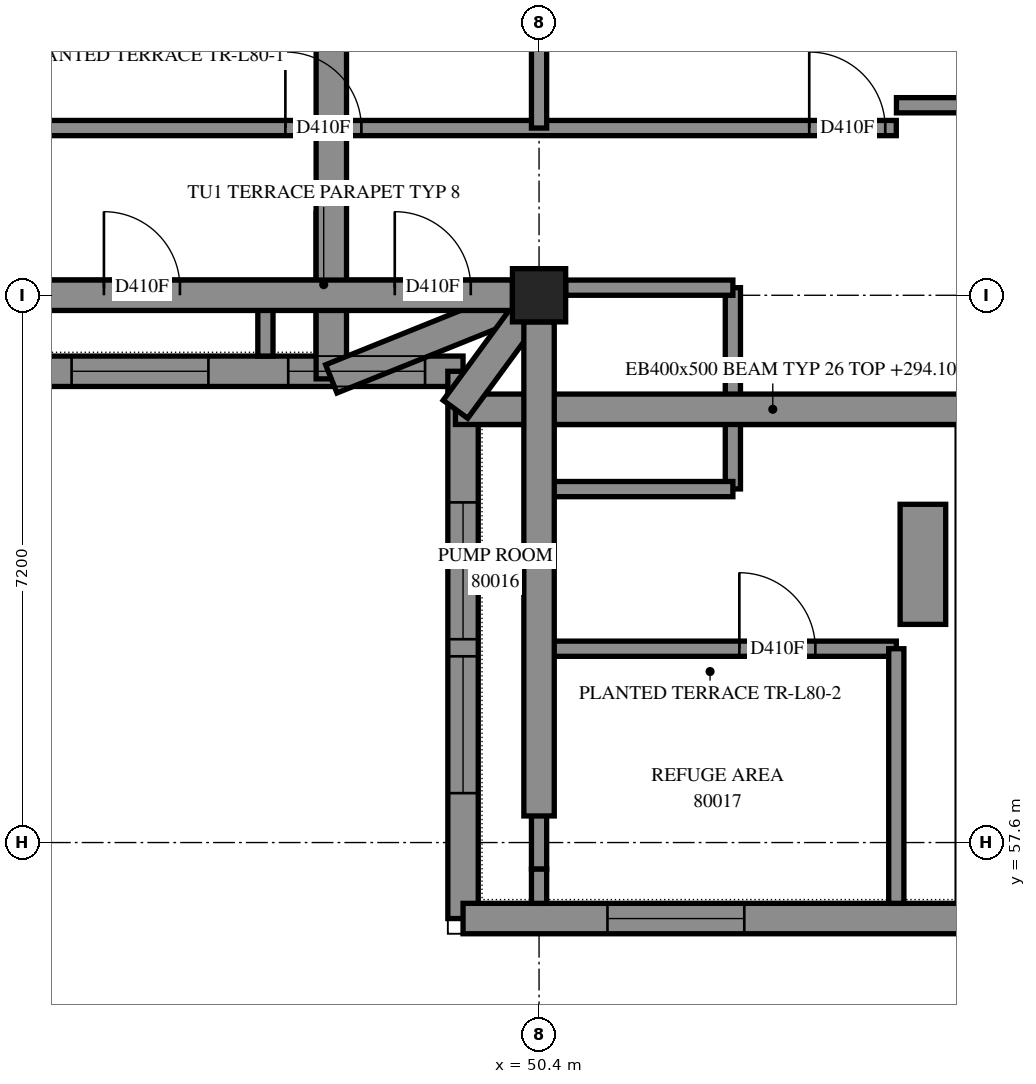
"""IFC4 building model, lengths in metres.
Left out: names, types, materials, properties, quantities, classifications, styles, units other than length and angle.
Written with IfcOpenShell. Run it as: python <this file> out.ifc"""

import sys

from ifc_helpers import new_model, si_unit, direction, frame, frame_2d, origin, origin_2d, place, context, subcontext, project, spatial, polyline, rectangle, outline, extrude, element, fill, save


model = new_model("IFC4")
c1 = context("Model", 3, precision=1e-05, world=origin(), true_north=direction((0.0, 1.0)))
c2 = subcontext(c1, "Body", "Model", "MODEL_VIEW")
j1 = project(units=[si_unit("LENGTHUNIT", "METRE"), si_unit("PLANEANGLEUNIT", "RADIAN")], contexts=[c1])
p1 = place(None, origin())
s1 = spatial("IfcSite", under=j1, at=p1, CompositionType="ELEMENT")
p2 = place(p1, origin())
s2 = spatial("IfcBuilding", under=s1, at=p2, CompositionType="ELEMENT")
p3 = place(p2, frame((0.0, 0.0, 294.4)))
s3 = spatial("IfcBuildingStorey", under=s2, at=p3, CompositionType="ELEMENT", Elevation=294.4)
p4 = place(p3, frame((50.4, 64.8, 0.0), z_axis=(0.0, 0.0, 1.0), x_axis=(1.0, 0.0, 0.0)))
e1 = element("IfcColumn", 1, at=p4, inside=s3, PredefinedType="COLUMN", context=c2, shape_type="SweptSolid", body=[
    extrude(rectangle(XDim=0.7, YDim=0.7, at=origin_2d()), origin(), (0.0, 0.0, 1.0), 3.5),
])
p5 = place(p3, frame((40.967, 63.8, 0.0), z_axis=(0.0, 0.0, 1.0), x_axis=(1.0, 0.0, 0.0)))
e2 = element("IfcWall", 2, at=p5, inside=s3, PredefinedType="SOLIDWALL", context=c2, shape_type="SweptSolid", body=[
    extrude(outline(polyline([(-0.2, -0.2), (8.233, -0.2), (8.633, 0.2), (0.2, 0.2), (-0.2, -0.2)])), origin(), (0.0, 0.0, 1.0), 3.5),
])
p6 = place(p5, frame((3.283, 0.0, 0.7)))
e3 = element("IfcOpeningElement", 3, at=p6, cuts=e2, PredefinedType="OPENING", context=c2, shape_type="SweptSolid", body=[
    extrude(rectangle(XDim=1.8, YDim=2.2, at=frame_2d((0.9, 1.1))), frame((0.0, 0.21, 0.0), z_axis=(0.0, -1.0, 0.0), x_axis=(1.0, 0.0, 0.0)), (0.0, 0.0, 1.0), 0.42),
])
p7 = place(p5, frame((6.133, 0.0, 0.7)))
e4 = element("IfcOpeningElement", 4, at=p7, cuts=e2, PredefinedType="OPENING", context=c2, shape_type="SweptSolid", body=[
    extrude(rectangle(XDim=1.8, YDim=2.2, at=frame_2d((0.9, 1.1))), frame((0.0, 0.21, 0.0), z_axis=(0.0, -1.0, 0.0), x_axis=(1.0, 0.0, 0.0)), (0.0, 0.0, 1.0), 0.42),
])
p8 = place(p3, frame((49.4, 63.8, 0.0), z_axis=(0.0, 0.0, 1.0), x_axis=(0.0, -1.0, 0.0)))
e5 = element("IfcWall", 5, at=p8, inside=s3, PredefinedType="SOLIDWALL", context=c2, shape_type="SweptSolid", body=[
    extrude(outline(polyline([(0.2, -0.2), (7.4, -0.2), (7.0, 0.2), (-0.2, 0.2), (0.2, -0.2)])), origin(), (0.0, 0.0, 1.0), 3.5),
])
p9 = place(p8, frame((3.75, 0.0, 0.7)))
e6 = element("IfcOpeningElement", 6, at=p9, cuts=e5, PredefinedType="OPENING", context=c2, shape_type="SweptSolid", body=[
    extrude(rectangle(XDim=1.8, YDim=2.2, at=frame_2d((0.9, 1.1))), frame((0.0, 0.21, 0.0), z_axis=(0.0, -1.0, 0.0), x_axis=(1.0, 0.0, 0.0)), (0.0, 0.0, 1.0), 0.42),
])
p10 = place(p8, frame((1.725, 0.0, 0.7)))
e7 = element("IfcOpeningElement", 7, at=p10, cuts=e5, PredefinedType="OPENING", context=c2, shape_type="SweptSolid", body=[
    extrude(rectangle(XDim=1.8, YDim=2.2, at=frame_2d((0.9, 1.1))), frame((0.0, 0.21, 0.0), z_axis=(0.0, -1.0, 0.0), x_axis=(1.0, 0.0, 0.0)), (0.0, 0.0, 1.0), 0.42),
])
p11 = place(p3, frame((49.4, 56.6, 0.0), z_axis=(0.0, 0.0, 1.0), x_axis=(1.0, 0.0, 0.0)))
e8 = element("IfcWall", 8, at=p11, inside=s3, PredefinedType="SOLIDWALL", context=c2, shape_type="SweptSolid", body=[
    extrude(outline(polyline([(-0.2, -0.2), (7.0, -0.2), (7.0, 0.2), (0.2, 0.2), (-0.2, -0.2)])), origin(), (0.0, 0.0, 1.0), 3.5),
])
p12 = place(p11, frame((1.9, 0.0, 0.7)))
e9 = element("IfcOpeningElement", 9, at=p12, cuts=e8, PredefinedType="OPENING", context=c2, shape_type="SweptSolid", body=[
    extrude(rectangle(XDim=1.8, YDim=2.2, at=frame_2d((0.9, 1.1))), frame((0.0, 0.21, 0.0), z_axis=(0.0, -1.0, 0.0), x_axis=(1.0, 0.0, 0.0)), (0.0, 0.0, 1.0), 0.42),
])
p13 = place(p3, frame((56.0, 63.2, 0.0), z_axis=(0.0, 0.0, 1.0), x_axis=(-1.0, 0.0, 0.0)))
e10 = element("IfcWall", 10, at=p13, inside=s3, PredefinedType="PARAPET", context=c2, shape_type="SweptSolid", body=[
    extrude(outline(polyline([(-0.1, -0.1), (6.4, -0.1), (6.4, 0.1), (0.1, 0.1), (-0.1, -0.1)])), origin(), (0.0, 0.0, 1.0), 0.25),
])
p14 = place(p3, frame((55.45, 60.47, 0.0), z_axis=(0.0, 0.0, 1.0), x_axis=(0.0, 1.0, 0.0)))
e11 = element("IfcWall", 11, at=p14, inside=s3, PredefinedType="SOLIDWALL", context=c2, shape_type="SweptSolid", body=[
    extrude(rectangle(XDim=1.58, YDim=0.6, at=frame_2d((0.79, 0.0))), origin(), (0.0, 0.0, 1.0), 0.65),
])
p15 = place(p3, frame((55.102, 67.3, 0.0), z_axis=(0.0, 0.0, 1.0), x_axis=(1.0, 0.0, 0.0)))
e12 = element("IfcWall", 12, at=p15, inside=s3, PredefinedType="PARTITIONING", context=c2, shape_type="SweptSolid", body=[
    extrude(rectangle(XDim=19.398, YDim=0.2, at=frame_2d((9.699, 0.0))), origin(), (0.0, 0.0, 1.0), 3.5),
])
p16 = place(p15, frame((6.361, 0.0, 0.0)))
e13 = element("IfcOpeningElement", 13, at=p16, cuts=e12, PredefinedType="OPENING", context=c2, shape_type="SweptSolid", body=[
    extrude(rectangle(XDim=1.0, YDim=2.1, at=frame_2d((0.5, 1.05))), frame((0.0, 0.11, 0.0), z_axis=(0.0, -1.0, 0.0), x_axis=(1.0, 0.0, 0.0)), (0.0, 0.0, 1.0), 0.22),
])
p17 = place(p15, frame((13.56, 0.0, 0.0)))
e14 = element("IfcOpeningElement", 14, at=p17, cuts=e12, PredefinedType="OPENING", context=c2, shape_type="SweptSolid", body=[
    extrude(rectangle(XDim=1.0, YDim=2.1, at=frame_2d((0.5, 1.05))), frame((0.0, 0.11, 0.0), z_axis=(0.0, -1.0, 0.0), x_axis=(1.0, 0.0, 0.0)), (0.0, 0.0, 1.0), 0.22),
])
p18 = place(p3, frame((43.2, 67.0, 0.0), z_axis=(0.0, 0.0, 1.0), x_axis=(1.0, 0.0, 0.0)))
e15 = element("IfcWall", 15, at=p18, inside=s3, PredefinedType="PARTITIONING", context=c2, shape_type="SweptSolid", body=[
    extrude(rectangle(XDim=11.9, YDim=0.2, at=frame_2d((5.95, 0.0))), origin(), (0.0, 0.0, 1.0), 3.5),
])
p19 = place(p18, frame((3.862, 0.0, 0.0)))
e16 = element("IfcOpeningElement", 16, at=p19, cuts=e15, PredefinedType="OPENING", context=c2, shape_type="SweptSolid", body=[
    extrude(rectangle(XDim=1.0, YDim=2.1, at=frame_2d((0.5, 1.05))), frame((0.0, 0.11, 0.0), z_axis=(0.0, -1.0, 0.0), x_axis=(1.0, 0.0, 0.0)), (0.0, 0.0, 1.0), 0.22),
])
p20 = place(p18, frame((10.755, 0.0, 0.0)))
e17 = element("IfcOpeningElement", 17, at=p20, cuts=e15, PredefinedType="OPENING", context=c2, shape_type="SweptSolid", body=[
    extrude(rectangle(XDim=1.0, YDim=2.1, at=frame_2d((0.5, 1.05))), frame((0.0, 0.11, 0.0), z_axis=(0.0, -1.0, 0.0), x_axis=(1.0, 0.0, 0.0)), (0.0, 0.0, 1.0), 0.22),
])
p21 = place(p3, frame((43.55, 64.9, 0.0), z_axis=(0.0, 0.0, 1.0), x_axis=(1.0, 0.0, 0.0)))
e18 = element("IfcWall", 18, at=p21, inside=s3, PredefinedType="PARTITIONING", context=c2, shape_type="SweptSolid", body=[
    extrude(rectangle(XDim=7.2, YDim=0.2, at=frame_2d((3.6, 0.0))), origin(), (0.0, 0.0, 1.0), 3.5),
])
p22 = place(p21, frame((1.125, 0.0, 0.0)))
e19 = element("IfcOpeningElement", 19, at=p22, cuts=e18, PredefinedType="OPENING", context=c2, shape_type="SweptSolid", body=[
    extrude(rectangle(XDim=1.0, YDim=2.1, at=frame_2d((0.5, 1.05))), frame((0.0, 0.11, 0.0), z_axis=(0.0, -1.0, 0.0), x_axis=(1.0, 0.0, 0.0)), (0.0, 0.0, 1.0), 0.22),
])
p23 = place(p21, frame((4.952, 0.0, 0.0)))
e20 = element("IfcOpeningElement", 20, at=p23, cuts=e18, PredefinedType="OPENING", context=c2, shape_type="SweptSolid", body=[
    extrude(rectangle(XDim=1.0, YDim=2.1, at=frame_2d((0.5, 1.05))), frame((0.0, 0.11, 0.0), z_axis=(0.0, -1.0, 0.0), x_axis=(1.0, 0.0, 0.0)), (0.0, 0.0, 1.0), 0.22),
])
p24 = place(p3, frame((50.4, 60.15, 0.0), z_axis=(0.0, 0.0, 1.0), x_axis=(1.0, 0.0, 0.0)))
e21 = element("IfcWall", 21, at=p24, inside=s3, PredefinedType="PARTITIONING", context=c2, shape_type="SweptSolid", body=[
    extrude(rectangle(XDim=4.7, YDim=0.2, at=frame_2d((2.35, 0.0))), origin(), (0.0, 0.0, 1.0), 3.5),
])
p25 = place(p24, frame((2.635, 0.0, 0.0)))
e22 = element("IfcOpeningElement", 22, at=p25, cuts=e21, PredefinedType="OPENING", context=c2, shape_type="SweptSolid", body=[
    extrude(rectangle(XDim=1.0, YDim=2.1, at=frame_2d((0.5, 1.05))), frame((0.0, 0.11, 0.0), z_axis=(0.0, -1.0, 0.0), x_axis=(1.0, 0.0, 0.0)), (0.0, 0.0, 1.0), 0.22),
])
p26 = place(p3, frame((50.4, 67.0, 0.0), z_axis=(0.0, 0.0, 1.0), x_axis=(0.0, 1.0, 0.0)))
e23 = element("IfcWall", 23, at=p26, inside=s3, PredefinedType="PARTITIONING", context=c2, shape_type="SweptSolid", body=[
    extrude(rectangle(XDim=5.35, YDim=0.2, at=frame_2d((2.675, 0.0))), origin(), (0.0, 0.0, 1.0), 3.0),
])
p27 = place(p3, frame((55.1, 56.8, 0.0), z_axis=(0.0, 0.0, 1.0), x_axis=(0.0, 1.0, 0.0)))
e24 = element("IfcWall", 24, at=p27, inside=s3, PredefinedType="PARTITIONING", context=c2, shape_type="SweptSolid", body=[
    extrude(rectangle(XDim=3.35, YDim=0.2, at=frame_2d((1.675, 0.0))), origin(), (0.0, 0.0, 1.0), 3.5),
])
p28 = place(p3, frame((52.95, 62.252, 0.0), z_axis=(0.0, 0.0, 1.0), x_axis=(0.0, 1.0, 0.0)))
e25 = element("IfcWall", 25, at=p28, inside=s3, PredefinedType="PARTITIONING", context=c2, shape_type="SweptSolid", body=[
    extrude(rectangle(XDim=2.648, YDim=0.2, at=frame_2d((1.324, 0.0))), origin(), (0.0, 0.0, 1.0), 3.5),
])
p29 = place(p3, frame((50.4, 62.25, 0.0), z_axis=(0.0, 0.0, 1.0), x_axis=(1.0, 0.0, 0.0)))
e26 = element("IfcWall", 26, at=p29, inside=s3, PredefinedType="PARTITIONING", context=c2, shape_type="SweptSolid", body=[
    extrude(rectangle(XDim=2.55, YDim=0.2, at=frame_2d((1.275, 0.0))), origin(), (0.0, 0.0, 1.0), 3.5),
])
p30 = place(p3, frame((50.75, 64.9, 0.0), z_axis=(0.0, 0.0, 1.0), x_axis=(1.0, 0.0, 0.0)))
e27 = element("IfcWall", 27, at=p30, inside=s3, PredefinedType="PARTITIONING", context=c2, shape_type="SweptSolid", body=[
    extrude(rectangle(XDim=2.2, YDim=0.2, at=frame_2d((1.1, 0.0))), origin(), (0.0, 0.0, 1.0), 3.5),
])
p31 = place(p3, frame((50.4, 57.25, 0.0), z_axis=(0.0, 0.0, 1.0), x_axis=(0.0, 1.0, 0.0)))
e28 = element("IfcWall", 28, at=p31, inside=s3, PredefinedType="PARTITIONING", context=c2, shape_type="SweptSolid", body=[
    extrude(rectangle(XDim=2.9, YDim=0.2, at=frame_2d((1.45, 0.0))), origin(), (0.0, 0.0, 1.0), 3.5),
])
p32 = place(p3, frame((50.4, 60.15, 0.0), z_axis=(0.0, 0.0, 1.0), x_axis=(0.0, 1.0, 0.0)))
e29 = element("IfcWall", 29, at=p32, inside=s3, PredefinedType="PARTITIONING", context=c2, shape_type="SweptSolid", body=[
    extrude(rectangle(XDim=2.1, YDim=0.2, at=frame_2d((1.05, 0.0))), origin(), (0.0, 0.0, 1.0), 3.5),
])
p33 = place(p3, frame((47.567, 64.0, 0.0), z_axis=(0.0, 0.0, 1.0), x_axis=(0.0, 1.0, 0.0)))
e30 = element("IfcWall", 30, at=p33, inside=s3, PredefinedType="PARAPET", context=c2, shape_type="SweptSolid", body=[
    extrude(outline(polyline([(0.0, -0.1), (1.88, -0.1), (1.88, 0.1), (0.0, 0.1), (0.0, -0.1)])), origin(), (0.0, 0.0, 1.0), 0.25),
])
p34 = place(p3, frame((46.8, 64.0, 0.0), z_axis=(0.0, 0.0, 1.0), x_axis=(0.0, 1.0, 0.0)))
e31 = element("IfcWall", 31, at=p34, inside=s3, PredefinedType="PARTITIONING", context=c2, shape_type="SweptSolid", body=[
    extrude(outline(polyline([(0.0, -0.1), (0.9, -0.1), (0.9, 0.1), (0.0, 0.1), (0.0, -0.1)])), origin(), (0.0, 0.0, 1.0), 3.5),
])
p35 = place(p3, frame((50.4, 56.8, 0.0), z_axis=(0.0, 0.0, 1.0), x_axis=(0.0, 1.0, 0.0)))
e32 = element("IfcWall", 32, at=p35, inside=s3, PredefinedType="PARTITIONING", context=c2, shape_type="SweptSolid", body=[
    extrude(outline(polyline([(0.0, -0.1), (0.45, -0.1), (0.45, 0.1), (0.0, 0.1), (0.0, -0.1)])), origin(), (0.0, 0.0, 1.0), 3.5),
])
p36 = place(p6, origin())
e33 = element("IfcWindow", 33, at=p36, inside=s3, PartitioningType="SINGLE_PANEL", PredefinedType="WINDOW", context=c2, shape_type="SweptSolid", body=[
    extrude(rectangle(XDim=1.8, YDim=2.2, at=frame_2d((0.9, 1.1))), frame((0.0, 0.08, 0.0), z_axis=(0.0, -1.0, 0.0), x_axis=(1.0, 0.0, 0.0)), (0.0, 0.0, 1.0), 0.06),
])
fill(e3, e33)
p37 = place(p7, origin())
e34 = element("IfcWindow", 34, at=p37, inside=s3, PartitioningType="SINGLE_PANEL", PredefinedType="WINDOW", context=c2, shape_type="SweptSolid", body=[
    extrude(rectangle(XDim=1.8, YDim=2.2, at=frame_2d((0.9, 1.1))), frame((0.0, 0.08, 0.0), z_axis=(0.0, -1.0, 0.0), x_axis=(1.0, 0.0, 0.0)), (0.0, 0.0, 1.0), 0.06),
])
fill(e4, e34)
p38 = place(p9, origin())
e35 = element("IfcWindow", 35, at=p38, inside=s3, PartitioningType="SINGLE_PANEL", PredefinedType="WINDOW", context=c2, shape_type="SweptSolid", body=[
    extrude(rectangle(XDim=1.8, YDim=2.2, at=frame_2d((0.9, 1.1))), frame((0.0, 0.08, 0.0), z_axis=(0.0, -1.0, 0.0), x_axis=(1.0, 0.0, 0.0)), (0.0, 0.0, 1.0), 0.06),
])
fill(e6, e35)
p39 = place(p12, origin())
e36 = element("IfcWindow", 36, at=p39, inside=s3, PartitioningType="SINGLE_PANEL", PredefinedType="WINDOW", context=c2, shape_type="SweptSolid", body=[
    extrude(rectangle(XDim=1.8, YDim=2.2, at=frame_2d((0.9, 1.1))), frame((0.0, 0.08, 0.0), z_axis=(0.0, -1.0, 0.0), x_axis=(1.0, 0.0, 0.0)), (0.0, 0.0, 1.0), 0.06),
])
fill(e9, e36)
p40 = place(p22, origin())
e37 = element("IfcDoor", 37, at=p40, inside=s3, OperationType="SINGLE_SWING_RIGHT", PredefinedType="DOOR", context=c2, shape_type="SweptSolid", body=[
    extrude(rectangle(XDim=1.0, YDim=2.1, at=frame_2d((0.5, 1.05))), frame((0.0, 0.025, 0.0), z_axis=(0.0, -1.0, 0.0), x_axis=(1.0, 0.0, 0.0)), (0.0, 0.0, 1.0), 0.05),
])
fill(e19, e37)
p41 = place(p19, origin())
e38 = element("IfcDoor", 38, at=p41, inside=s3, OperationType="SINGLE_SWING_RIGHT", PredefinedType="DOOR", context=c2, shape_type="SweptSolid", body=[
    extrude(rectangle(XDim=1.0, YDim=2.1, at=frame_2d((0.5, 1.05))), frame((0.0, 0.025, 0.0), z_axis=(0.0, -1.0, 0.0), x_axis=(1.0, 0.0, 0.0)), (0.0, 0.0, 1.0), 0.05),
])
fill(e16, e38)
p42 = place(p20, origin())
e39 = element("IfcDoor", 39, at=p42, inside=s3, OperationType="SINGLE_SWING_RIGHT", PredefinedType="DOOR", context=c2, shape_type="SweptSolid", body=[
    extrude(rectangle(XDim=1.0, YDim=2.1, at=frame_2d((0.5, 1.05))), frame((0.0, 0.025, 0.0), z_axis=(0.0, -1.0, 0.0), x_axis=(1.0, 0.0, 0.0)), (0.0, 0.0, 1.0), 0.05),
])
fill(e17, e39)
p43 = place(p23, origin())
e40 = element("IfcDoor", 40, at=p43, inside=s3, OperationType="SINGLE_SWING_RIGHT", PredefinedType="DOOR", context=c2, shape_type="SweptSolid", body=[
    extrude(rectangle(XDim=1.0, YDim=2.1, at=frame_2d((0.5, 1.05))), frame((0.0, 0.025, 0.0), z_axis=(0.0, -1.0, 0.0), x_axis=(1.0, 0.0, 0.0)), (0.0, 0.0, 1.0), 0.05),
])
fill(e20, e40)
p44 = place(p25, origin())
e41 = element("IfcDoor", 41, at=p44, inside=s3, OperationType="SINGLE_SWING_LEFT", PredefinedType="DOOR", context=c2, shape_type="SweptSolid", body=[
    extrude(rectangle(XDim=1.0, YDim=2.1, at=frame_2d((0.5, 1.05))), frame((0.0, 0.025, 0.0), z_axis=(0.0, -1.0, 0.0), x_axis=(1.0, 0.0, 0.0)), (0.0, 0.0, 1.0), 0.05),
])
fill(e22, e41)
p45 = place(p10, origin())
e42 = element("IfcWindow", 42, at=p45, inside=s3, PartitioningType="SINGLE_PANEL", PredefinedType="WINDOW", context=c2, shape_type="SweptSolid", body=[
    extrude(rectangle(XDim=1.8, YDim=2.2, at=frame_2d((0.9, 1.1))), frame((0.0, 0.08, 0.0), z_axis=(0.0, -1.0, 0.0), x_axis=(1.0, 0.0, 0.0)), (0.0, 0.0, 1.0), 0.06),
])
fill(e7, e42)
save(model, sys.argv[1])
